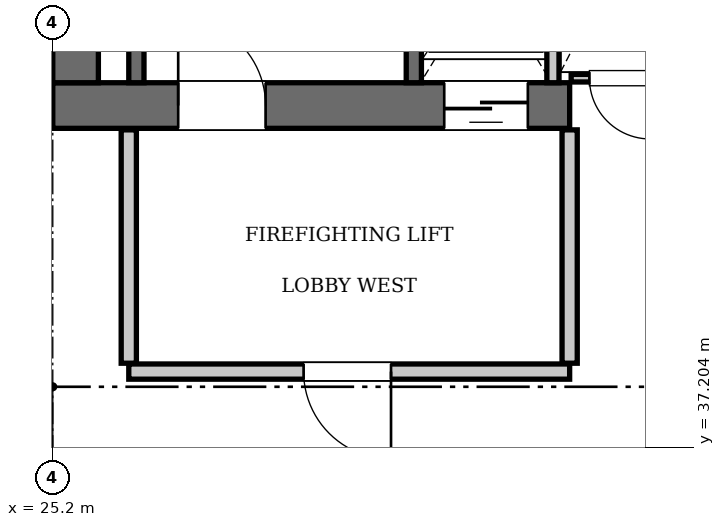
"""IFC4 building model, lengths in metres.
Left out: names, types, materials, properties, quantities, classifications, styles, units other than length and angle.
Written with IfcOpenShell. Run it as: python <this file> out.ifc"""

import sys

from ifc_helpers import new_model, si_unit, direction, frame, frame_2d, origin, place, context, subcontext, project, spatial, rectangle, extrude, element, fill, save


model = new_model("IFC4")
c1 = context("Model", 3, precision=1e-05, world=origin(), true_north=direction((0.0, 1.0)))
c2 = subcontext(c1, "Body", "Model", "MODEL_VIEW")
j1 = project(units=[si_unit("LENGTHUNIT", "METRE"), si_unit("PLANEANGLEUNIT", "RADIAN")], contexts=[c1])
p1 = place(None, origin())
s1 = spatial("IfcSite", under=j1, at=p1, CompositionType="ELEMENT")
p2 = place(p1, origin())
s2 = spatial("IfcBuilding", under=s1, at=p2, CompositionType="ELEMENT")
p3 = place(p2, frame((0.0, 0.0, 301.0)))
s3 = spatial("IfcBuildingStorey", under=s2, at=p3, CompositionType="ELEMENT", Elevation=301.0)
p4 = place(p3, frame((25.2, 41.7, 0.0), z_axis=(0.0, 0.0, 1.0), x_axis=(1.0, 0.0, 0.0)))
e1 = element("IfcWall", 1, at=p4, inside=s3, PredefinedType="SHEAR", context=c2, shape_type="SweptSolid", body=[
    extrude(rectangle(XDim=6.8, YDim=0.6, at=frame_2d((3.4, 0.0))), origin(), (0.0, 0.0, 1.0), 3.85),
])
p5 = place(p4, frame((1.65, 0.0, 0.0)))
e2 = element("IfcOpeningElement", 2, at=p5, cuts=e1, PredefinedType="OPENING", context=c2, shape_type="SweptSolid", body=[
    extrude(rectangle(XDim=1.15, YDim=2.15, at=frame_2d((0.575, 1.075))), frame((0.0, 0.31, 0.0), z_axis=(0.0, -1.0, 0.0), x_axis=(1.0, 0.0, 0.0)), (0.0, 0.0, 1.0), 0.62),
])
p6 = place(p4, frame((5.15, 0.0, 0.0)))
e3 = element("IfcOpeningElement", 3, at=p6, cuts=e1, PredefinedType="OPENING", context=c2, shape_type="SweptSolid", body=[
    extrude(rectangle(XDim=1.1, YDim=2.2, at=frame_2d((0.55, 1.1))), frame((0.0, 0.31, 0.0), z_axis=(0.0, -1.0, 0.0), x_axis=(1.0, 0.0, 0.0)), (0.0, 0.0, 1.0), 0.62),
])
p7 = place(p3, frame((25.5, 42.0, 0.0), z_axis=(0.0, 0.0, 1.0), x_axis=(0.0, 1.0, 0.0)))
e4 = element("IfcWall", 4, at=p7, inside=s3, PredefinedType="SHEAR", context=c2, shape_type="SweptSolid", body=[
    extrude(rectangle(XDim=2.2, YDim=0.6, at=frame_2d((1.1, 0.0))), origin(), (0.0, 0.0, 1.0), 3.85),
])
p8 = place(p3, frame((29.95, 42.0, 0.0), z_axis=(0.0, 0.0, 1.0), x_axis=(0.0, 1.0, 0.0)))
e5 = element("IfcWall", 5, at=p8, inside=s3, PredefinedType="SOLIDWALL", context=c2, shape_type="SweptSolid", body=[
    extrude(rectangle(XDim=9.15, YDim=0.2, at=frame_2d((4.575, 0.0))), origin(), (0.0, 0.0, 1.0), 3.61),
])
p9 = place(p3, frame((26.3, 42.0, 0.0), z_axis=(0.0, 0.0, 1.0), x_axis=(0.0, 1.0, 0.0)))
e6 = element("IfcWall", 6, at=p9, inside=s3, PredefinedType="SOLIDWALL", context=c2, shape_type="SweptSolid", body=[
    extrude(rectangle(XDim=9.12, YDim=0.2, at=frame_2d((4.56, 0.0))), origin(), (0.0, 0.0, 1.0), 3.61),
])
p10 = place(p3, frame((31.78, 42.0, 0.0), z_axis=(0.0, 0.0, 1.0), x_axis=(0.0, 1.0, 0.0)))
e7 = element("IfcWall", 7, at=p10, inside=s3, PredefinedType="SOLIDWALL", context=c2, shape_type="SweptSolid", body=[
    extrude(rectangle(XDim=2.74, YDim=0.16, at=frame_2d((1.37, 0.0))), origin(), (0.0, 0.0, 1.0), 3.61),
])
p11 = place(p3, frame((26.2, 38.2, 0.0), z_axis=(0.0, 0.0, 1.0), x_axis=(1.0, 0.0, 0.0)))
e8 = element("IfcWall", 8, at=p11, inside=s3, PredefinedType="PARTITIONING", context=c2, shape_type="SweptSolid", body=[
    extrude(rectangle(XDim=5.8, YDim=0.2, at=frame_2d((2.9, 0.0))), origin(), (0.0, 0.0, 1.0), 3.61),
])
p12 = place(p11, frame((2.3, 0.0, 0.0)))
e9 = element("IfcOpeningElement", 9, at=p12, cuts=e8, PredefinedType="OPENING", context=c2, shape_type="SweptSolid", body=[
    extrude(rectangle(XDim=1.15, YDim=2.15, at=frame_2d((0.575, 1.075))), frame((0.0, 0.11, 0.0), z_axis=(0.0, -1.0, 0.0), x_axis=(1.0, 0.0, 0.0)), (0.0, 0.0, 1.0), 0.22),
])
for number, where, z_axis, x_axis in (
    (10, (26.2, 38.31, 0.0), (0.0, 0.0, 1.0), (0.0, 1.0, 0.0)),
    (11, (32.0, 38.31, 0.0), (0.0, 0.0, 1.0), (0.0, 1.0, 0.0)),
):
    element("IfcWall", number, at=place(p3, frame(where, z_axis=z_axis, x_axis=x_axis)), inside=s3, PredefinedType="PARTITIONING", context=c2, shape_type="SweptSolid", body=[
        extrude(rectangle(XDim=3.07, YDim=0.2, at=frame_2d((1.535, 0.0))), origin(), (0.0, 0.0, 1.0), 3.61),
    ])
p13 = place(p3, frame((32.02, 42.06, 0.0), z_axis=(0.0, 0.0, 1.0), x_axis=(1.0, 0.0, 0.0)))
e12 = element("IfcWall", 12, at=p13, inside=s3, PredefinedType="PARTITIONING", context=c2, shape_type="SweptSolid", body=[
    extrude(rectangle(XDim=1.32, YDim=0.1, at=frame_2d((0.66, 0.0))), origin(), (0.0, 0.0, 1.0), 3.61),
])
p14 = place(p13, frame((0.24, 0.0, 0.0)))
e13 = element("IfcOpeningElement", 13, at=p14, cuts=e12, PredefinedType="OPENING", context=c2, shape_type="SweptSolid", body=[
    extrude(rectangle(XDim=0.8, YDim=2.05, at=frame_2d((0.4, 1.025))), frame((0.0, 0.06, 0.0), z_axis=(0.0, -1.0, 0.0), x_axis=(1.0, 0.0, 0.0)), (0.0, 0.0, 1.0), 0.12),
])
p15 = place(p5, origin())
e14 = element("IfcDoor", 14, at=p15, inside=s3, OperationType="SINGLE_SWING_LEFT", PredefinedType="DOOR", context=c2, shape_type="SweptSolid", body=[
    extrude(rectangle(XDim=1.15, YDim=2.15, at=frame_2d((0.575, 1.075))), frame((0.0, 0.025, 0.0), z_axis=(0.0, -1.0, 0.0), x_axis=(1.0, 0.0, 0.0)), (0.0, 0.0, 1.0), 0.05),
])
fill(e2, e14)
p16 = place(p6, frame((1.1, 0.0, 0.0), z_axis=(0.0, 0.0, 1.0), x_axis=(-1.0, 0.0, 0.0)))
e15 = element("IfcDoor", 15, at=p16, inside=s3, OperationType="SLIDING_TO_LEFT", PredefinedType="DOOR", context=c2, shape_type="SweptSolid", body=[
    extrude(rectangle(XDim=1.1, YDim=2.2, at=frame_2d((0.55, 1.1))), frame((0.0, 0.025, 0.0), z_axis=(0.0, -1.0, 0.0), x_axis=(1.0, 0.0, 0.0)), (0.0, 0.0, 1.0), 0.05),
])
fill(e3, e15)
p17 = place(p12, frame((1.15, 0.0, 0.0), z_axis=(0.0, 0.0, 1.0), x_axis=(-1.0, 0.0, 0.0)))
e16 = element("IfcDoor", 16, at=p17, inside=s3, OperationType="SINGLE_SWING_LEFT", PredefinedType="DOOR", context=c2, shape_type="SweptSolid", body=[
    extrude(rectangle(XDim=1.15, YDim=2.15, at=frame_2d((0.575, 1.075))), frame((0.0, 0.025, 0.0), z_axis=(0.0, -1.0, 0.0), x_axis=(1.0, 0.0, 0.0)), (0.0, 0.0, 1.0), 0.05),
])
fill(e9, e16)
p18 = place(p14, frame((0.8, 0.0, 0.0), z_axis=(0.0, 0.0, 1.0), x_axis=(-1.0, 0.0, 0.0)))
e17 = element("IfcDoor", 17, at=p18, inside=s3, OperationType="SINGLE_SWING_LEFT", PredefinedType="DOOR", context=c2, shape_type="SweptSolid", body=[
    extrude(rectangle(XDim=0.8, YDim=2.05, at=frame_2d((0.4, 1.025))), frame((0.0, 0.025, 0.0), z_axis=(0.0, -1.0, 0.0), x_axis=(1.0, 0.0, 0.0)), (0.0, 0.0, 1.0), 0.05),
])
fill(e13, e17)
save(model, sys.argv[1])
